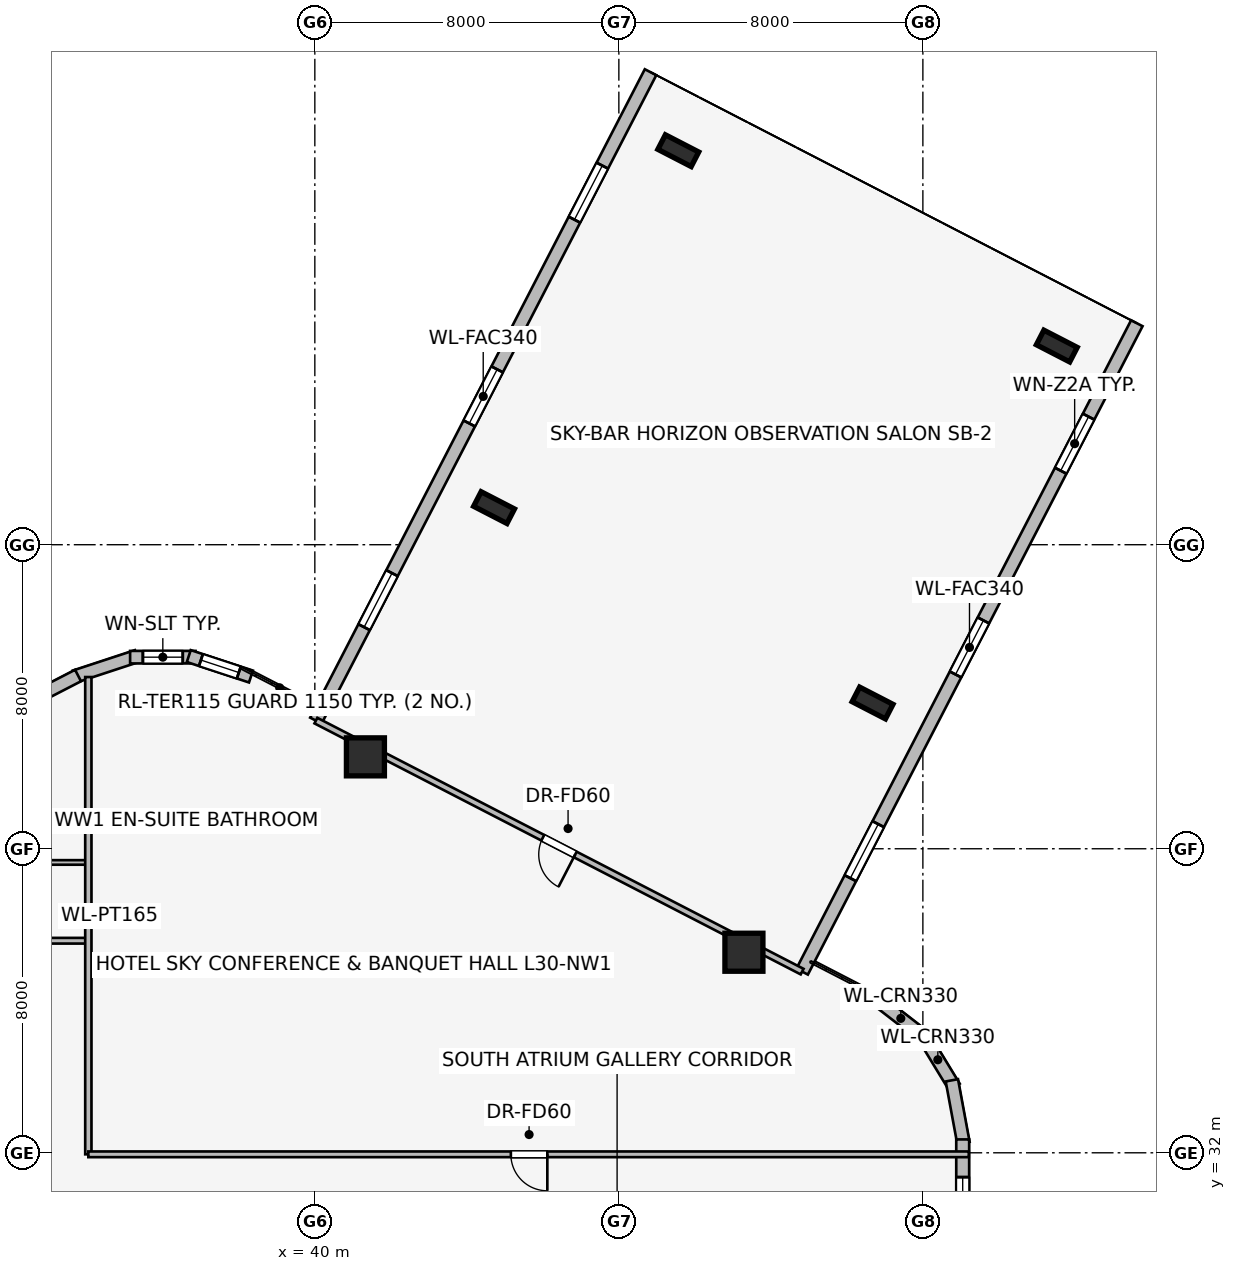
"""IFC4 building model, lengths in metres.
Left out: names, types, materials, properties, quantities, classifications, styles, units other than length and angle.
Written with IfcOpenShell. Run it as: python <this file> out.ifc"""

import sys

from ifc_helpers import new_model, si_unit, direction, frame, frame_2d, origin, origin_2d, place, context, subcontext, project, spatial, rectangle, i_section, extrude, element, fill, save


model = new_model("IFC4")
c1 = context("Model", 3, precision=1e-05, world=origin(), true_north=direction((0.0, 1.0)))
c2 = subcontext(c1, "Body", "Model", "MODEL_VIEW")
j1 = project(units=[si_unit("LENGTHUNIT", "METRE"), si_unit("PLANEANGLEUNIT", "RADIAN")], contexts=[c1])
p1 = place(None, origin())
s1 = spatial("IfcSite", under=j1, at=p1, CompositionType="ELEMENT")
p2 = place(p1, origin())
s2 = spatial("IfcBuilding", under=s1, at=p2, CompositionType="ELEMENT")
p3 = place(p2, frame((0.0, 0.0, 115.35)))
s3 = spatial("IfcBuildingStorey", under=s2, at=p3, CompositionType="ELEMENT", Elevation=115.35)
for number, where, z_axis, x_axis in (
    (1, (51.291, 37.277, 0.0), (0.0, 0.0, 1.0), (1.0, 0.0, 0.0)),
    (2, (41.331, 42.418, 0.0), (0.0, 0.0, 1.0), (1.0, 0.0, 0.0)),
):
    element("IfcColumn", number, at=place(p3, frame(where, z_axis=z_axis, x_axis=x_axis)), inside=s3, PredefinedType="COLUMN", context=c2, shape_type="SweptSolid", body=[
        extrude(rectangle(XDim=1.0, YDim=1.0, at=origin_2d()), origin(), (0.0, 0.0, 1.0), 3.45),
    ])
for number, where, z_axis, x_axis in (
    (3, (54.676, 43.835, 0.0), (0.0, 0.0, 1.0), (0.459, 0.889, 0.0)),
    (4, (44.716, 48.976, 0.0), (0.0, 0.0, 1.0), (0.459, 0.889, 0.0)),
    (5, (59.524, 53.227, 0.0), (0.0, 0.0, 1.0), (0.459, 0.889, 0.0)),
    (6, (49.564, 58.368, 0.0), (0.0, 0.0, 1.0), (0.459, 0.889, 0.0)),
):
    element("IfcColumn", number, at=place(p3, frame(where, z_axis=z_axis, x_axis=x_axis)), inside=s3, PredefinedType="COLUMN", context=c2, shape_type="SweptSolid", body=[
        extrude(i_section(OverallWidth=0.431, OverallDepth=0.987, WebThickness=0.034, FlangeThickness=0.062, at=origin_2d()), origin(), (0.0, 0.0, 1.0), 3.45),
    ])
p4 = place(p3, frame((54.757, 36.05, 0.0), z_axis=(0.0, 0.0, 1.0), x_axis=(0.790621329885, -0.612305408053, 0.0)))
e7 = element("IfcWall", 7, at=p4, inside=s3, PredefinedType="STANDARD", context=c2, shape_type="SweptSolid", body=[
    extrude(rectangle(XDim=1.676, YDim=0.33, at=frame_2d((0.838, 0.0))), origin(), (0.0, 0.0, 1.0), 3.16),
])
p5 = place(p3, frame((55.957, 35.164, 0.0), z_axis=(0.0, 0.0, 1.0), x_axis=(0.520519429557, -0.853849824883, 0.0)))
e8 = element("IfcWall", 8, at=p5, inside=s3, PredefinedType="STANDARD", context=c2, shape_type="SweptSolid", body=[
    extrude(rectangle(XDim=1.677, YDim=0.33, at=frame_2d((0.839, 0.0))), origin(), (0.0, 0.0, 1.0), 3.16),
])
p6 = place(p3, frame((56.763, 33.907, 0.0), z_axis=(0.0, 0.0, 1.0), x_axis=(0.181984991895, -0.983301308209, 0.0)))
e9 = element("IfcWall", 9, at=p6, inside=s3, PredefinedType="STANDARD", context=c2, shape_type="SweptSolid", body=[
    extrude(rectangle(XDim=1.677, YDim=0.33, at=frame_2d((0.838, 0.0))), origin(), (0.0, 0.0, 1.0), 3.16),
])
p7 = place(p3, frame((61.63, 53.828, 0.0), z_axis=(0.0, 0.0, 1.0), x_axis=(-0.458697010696, -0.888592737073, 0.0)))
e10 = element("IfcWall", 10, at=p7, inside=s3, PredefinedType="STANDARD", context=c2, shape_type="SweptSolid", body=[
    extrude(rectangle(XDim=19.2, YDim=0.34, at=frame_2d((9.6, 0.0))), origin(), (0.0, 0.0, 1.0), 3.16),
])
p8 = place(p7, frame((2.767, 0.0, 0.75)))
e11 = element("IfcOpeningElement", 11, at=p8, cuts=e10, PredefinedType="OPENING", context=c2, shape_type="SweptSolid", body=[
    extrude(rectangle(XDim=1.6, YDim=1.55, at=frame_2d((0.8, 0.775))), frame((0.0, 0.18, 0.0), z_axis=(0.0, -1.0, 0.0), x_axis=(1.0, 0.0, 0.0)), (0.0, 0.0, 1.0), 0.36),
])
p9 = place(p7, frame((8.8, 0.0, 0.75)))
e12 = element("IfcOpeningElement", 12, at=p9, cuts=e10, PredefinedType="OPENING", context=c2, shape_type="SweptSolid", body=[
    extrude(rectangle(XDim=1.6, YDim=1.55, at=frame_2d((0.8, 0.775))), frame((0.0, 0.18, 0.0), z_axis=(0.0, -1.0, 0.0), x_axis=(1.0, 0.0, 0.0)), (0.0, 0.0, 1.0), 0.36),
])
p10 = place(p7, frame((14.833, 0.0, 0.75)))
e13 = element("IfcOpeningElement", 13, at=p10, cuts=e10, PredefinedType="OPENING", context=c2, shape_type="SweptSolid", body=[
    extrude(rectangle(XDim=1.6, YDim=1.55, at=frame_2d((0.8, 0.775))), frame((0.0, 0.18, 0.0), z_axis=(0.0, -1.0, 0.0), x_axis=(1.0, 0.0, 0.0)), (0.0, 0.0, 1.0), 0.36),
])
p11 = place(p3, frame((40.028, 43.372, 0.0), z_axis=(0.0, 0.0, 1.0), x_axis=(0.45865166523, 0.888616143215, 0.0)))
e14 = element("IfcWall", 14, at=p11, inside=s3, PredefinedType="STANDARD", context=c2, shape_type="SweptSolid", body=[
    extrude(rectangle(XDim=19.199, YDim=0.34, at=frame_2d((9.6, 0.0))), origin(), (0.0, 0.0, 1.0), 3.16),
])
p12 = place(p11, frame((2.767, 0.0, 0.75)))
e15 = element("IfcOpeningElement", 15, at=p12, cuts=e14, PredefinedType="OPENING", context=c2, shape_type="SweptSolid", body=[
    extrude(rectangle(XDim=1.6, YDim=1.55, at=frame_2d((0.8, 0.775))), frame((0.0, 0.18, 0.0), z_axis=(0.0, -1.0, 0.0), x_axis=(1.0, 0.0, 0.0)), (0.0, 0.0, 1.0), 0.36),
])
p13 = place(p11, frame((8.8, 0.0, 0.75)))
e16 = element("IfcOpeningElement", 16, at=p13, cuts=e14, PredefinedType="OPENING", context=c2, shape_type="SweptSolid", body=[
    extrude(rectangle(XDim=1.6, YDim=1.55, at=frame_2d((0.8, 0.775))), frame((0.0, 0.18, 0.0), z_axis=(0.0, -1.0, 0.0), x_axis=(1.0, 0.0, 0.0)), (0.0, 0.0, 1.0), 0.36),
])
p14 = place(p11, frame((14.833, 0.0, 0.75)))
e17 = element("IfcOpeningElement", 17, at=p14, cuts=e14, PredefinedType="OPENING", context=c2, shape_type="SweptSolid", body=[
    extrude(rectangle(XDim=1.6, YDim=1.55, at=frame_2d((0.8, 0.775))), frame((0.0, 0.18, 0.0), z_axis=(0.0, -1.0, 0.0), x_axis=(1.0, 0.0, 0.0)), (0.0, 0.0, 1.0), 0.36),
])
p15 = place(p3, frame((33.681, 44.532, 0.0), z_axis=(0.0, 0.0, 1.0), x_axis=(0.949937416267, 0.312440242569, 0.0)))
e18 = element("IfcWall", 18, at=p15, inside=s3, PredefinedType="STANDARD", context=c2, shape_type="SweptSolid", body=[
    extrude(rectangle(XDim=1.722, YDim=0.33, at=frame_2d((0.861, 0.0))), origin(), (0.0, 0.0, 1.0), 3.16),
])
p16 = place(p3, frame((35.139, 45.041, 0.0), z_axis=(0.0, 0.0, 1.0), x_axis=(1.0, 0.0, 0.0)))
e19 = element("IfcWall", 19, at=p16, inside=s3, PredefinedType="STANDARD", context=c2, shape_type="SweptSolid", body=[
    extrude(rectangle(XDim=1.722, YDim=0.33, at=frame_2d((0.861, 0.0))), origin(), (0.0, 0.0, 1.0), 3.16),
])
p17 = place(p16, frame((0.336, 0.0, 0.75)))
e20 = element("IfcOpeningElement", 20, at=p17, cuts=e19, PredefinedType="OPENING", context=c2, shape_type="SweptSolid", body=[
    extrude(rectangle(XDim=1.05, YDim=1.4, at=frame_2d((0.525, 0.7))), frame((0.0, 0.175, 0.0), z_axis=(0.0, -1.0, 0.0), x_axis=(1.0, 0.0, 0.0)), (0.0, 0.0, 1.0), 0.35),
])
p18 = place(p3, frame((36.683, 45.07, 0.0), z_axis=(0.0, 0.0, 1.0), x_axis=(0.949937416267, -0.312440242569, 0.0)))
e21 = element("IfcWall", 21, at=p18, inside=s3, PredefinedType="STANDARD", context=c2, shape_type="SweptSolid", body=[
    extrude(rectangle(XDim=1.722, YDim=0.33, at=frame_2d((0.861, 0.0))), origin(), (0.0, 0.0, 1.0), 3.16),
])
p19 = place(p18, frame((0.336, 0.0, 0.75)))
e22 = element("IfcOpeningElement", 22, at=p19, cuts=e21, PredefinedType="OPENING", context=c2, shape_type="SweptSolid", body=[
    extrude(rectangle(XDim=1.05, YDim=1.4, at=frame_2d((0.525, 0.7))), frame((0.0, 0.175, 0.0), z_axis=(0.0, -1.0, 0.0), x_axis=(1.0, 0.0, 0.0)), (0.0, 0.0, 1.0), 0.35),
])
p20 = place(p3, frame((17.169, 35.99, 0.0), z_axis=(0.0, 0.0, 1.0), x_axis=(0.888613612362, 0.458656568606, 0.0)))
e23 = element("IfcWall", 23, at=p20, inside=s3, PredefinedType="STANDARD", context=c2, shape_type="SweptSolid", body=[
    extrude(rectangle(XDim=18.681, YDim=0.34, at=frame_2d((9.34, 0.0))), origin(), (0.0, 0.0, 1.0), 3.16),
])
p21 = place(p20, frame((1.023, 0.0, 0.75)))
e24 = element("IfcOpeningElement", 24, at=p21, cuts=e23, PredefinedType="OPENING", context=c2, shape_type="SweptSolid", body=[
    extrude(rectangle(XDim=1.6, YDim=1.55, at=frame_2d((0.8, 0.775))), frame((0.0, 0.18, 0.0), z_axis=(0.0, -1.0, 0.0), x_axis=(1.0, 0.0, 0.0)), (0.0, 0.0, 1.0), 0.36),
])
p22 = place(p20, frame((4.981, 0.0, 0.75)))
e25 = element("IfcOpeningElement", 25, at=p22, cuts=e23, PredefinedType="OPENING", context=c2, shape_type="SweptSolid", body=[
    extrude(rectangle(XDim=2.1, YDim=1.5, at=frame_2d((1.05, 0.75))), frame((0.0, 0.18, 0.0), z_axis=(0.0, -1.0, 0.0), x_axis=(1.0, 0.0, 0.0)), (0.0, 0.0, 1.0), 0.36),
])
p23 = place(p20, frame((8.29, 0.0, 0.75)))
e26 = element("IfcOpeningElement", 26, at=p23, cuts=e23, PredefinedType="OPENING", context=c2, shape_type="SweptSolid", body=[
    extrude(rectangle(XDim=2.1, YDim=1.5, at=frame_2d((1.05, 0.75))), frame((0.0, 0.18, 0.0), z_axis=(0.0, -1.0, 0.0), x_axis=(1.0, 0.0, 0.0)), (0.0, 0.0, 1.0), 0.36),
])
p24 = place(p20, frame((11.6, 0.0, 0.75)))
e27 = element("IfcOpeningElement", 27, at=p24, cuts=e23, PredefinedType="OPENING", context=c2, shape_type="SweptSolid", body=[
    extrude(rectangle(XDim=2.1, YDim=1.5, at=frame_2d((1.05, 0.75))), frame((0.0, 0.18, 0.0), z_axis=(0.0, -1.0, 0.0), x_axis=(1.0, 0.0, 0.0)), (0.0, 0.0, 1.0), 0.36),
])
p25 = place(p20, frame((16.058, 0.0, 0.75)))
e28 = element("IfcOpeningElement", 28, at=p25, cuts=e23, PredefinedType="OPENING", context=c2, shape_type="SweptSolid", body=[
    extrude(rectangle(XDim=1.6, YDim=1.55, at=frame_2d((0.8, 0.775))), frame((0.0, 0.18, 0.0), z_axis=(0.0, -1.0, 0.0), x_axis=(1.0, 0.0, 0.0)), (0.0, 0.0, 1.0), 0.36),
])
p26 = place(p3, frame((57.048, 32.352, 0.0), z_axis=(0.0, 0.0, 1.0), x_axis=(0.0, -1.0, 0.0)))
e29 = element("IfcWall", 29, at=p26, inside=s3, PredefinedType="STANDARD", context=c2, shape_type="SweptSolid", body=[
    extrude(rectangle(XDim=16.704, YDim=0.34, at=frame_2d((8.352, 0.0))), origin(), (0.0, 0.0, 1.0), 3.16),
])
p27 = place(p26, frame((0.992, 0.0, 0.75)))
e30 = element("IfcOpeningElement", 30, at=p27, cuts=e29, PredefinedType="OPENING", context=c2, shape_type="SweptSolid", body=[
    extrude(rectangle(XDim=1.05, YDim=1.4, at=frame_2d((0.525, 0.7))), frame((0.0, 0.18, 0.0), z_axis=(0.0, -1.0, 0.0), x_axis=(1.0, 0.0, 0.0)), (0.0, 0.0, 1.0), 0.36),
])
p28 = place(p26, frame((4.935, 0.0, 0.75)))
e31 = element("IfcOpeningElement", 31, at=p28, cuts=e29, PredefinedType="OPENING", context=c2, shape_type="SweptSolid", body=[
    extrude(rectangle(XDim=2.1, YDim=1.5, at=frame_2d((1.05, 0.75))), frame((0.0, 0.18, 0.0), z_axis=(0.0, -1.0, 0.0), x_axis=(1.0, 0.0, 0.0)), (0.0, 0.0, 1.0), 0.36),
])
p29 = place(p26, frame((9.919, 0.0, 0.75)))
e32 = element("IfcOpeningElement", 32, at=p29, cuts=e29, PredefinedType="OPENING", context=c2, shape_type="SweptSolid", body=[
    extrude(rectangle(XDim=1.6, YDim=1.55, at=frame_2d((0.8, 0.775))), frame((0.0, 0.18, 0.0), z_axis=(0.0, -1.0, 0.0), x_axis=(1.0, 0.0, 0.0)), (0.0, 0.0, 1.0), 0.36),
])
p30 = place(p26, frame((14.702, 0.0, 0.75)))
e33 = element("IfcOpeningElement", 33, at=p30, cuts=e29, PredefinedType="OPENING", context=c2, shape_type="SweptSolid", body=[
    extrude(rectangle(XDim=1.05, YDim=1.4, at=frame_2d((0.525, 0.7))), frame((0.0, 0.18, 0.0), z_axis=(0.0, -1.0, 0.0), x_axis=(1.0, 0.0, 0.0)), (0.0, 0.0, 1.0), 0.36),
])
p31 = place(p3, frame((34.0, 39.64, 0.0), z_axis=(0.0, 0.0, 1.0), x_axis=(-1.0, 0.0, 0.0)))
e34 = element("IfcWall", 34, at=p31, inside=s3, PredefinedType="PARTITIONING", context=c2, shape_type="SweptSolid", body=[
    extrude(rectangle(XDim=2.34, YDim=0.12, at=frame_2d((1.17, 0.0))), origin(), (0.0, 0.0, 1.0), 2.552),
])
p32 = place(p3, frame((34.0, 37.58, 0.0), z_axis=(0.0, 0.0, 1.0), x_axis=(-1.0, 0.0, 0.0)))
e35 = element("IfcWall", 35, at=p32, inside=s3, PredefinedType="PARTITIONING", context=c2, shape_type="SweptSolid", body=[
    extrude(rectangle(XDim=13.707, YDim=0.15, at=frame_2d((6.854, 0.0))), origin(), (0.0, 0.0, 1.0), 2.627),
])
p33 = place(p32, frame((4.96, 0.0, 0.0)))
e36 = element("IfcOpeningElement", 36, at=p33, cuts=e35, PredefinedType="OPENING", context=c2, shape_type="SweptSolid", body=[
    extrude(rectangle(XDim=0.96, YDim=2.0, at=frame_2d((0.48, 1.0))), frame((0.0, 0.085, 0.0), z_axis=(0.0, -1.0, 0.0), x_axis=(1.0, 0.0, 0.0)), (0.0, 0.0, 1.0), 0.17),
])
p34 = place(p3, frame((34.04, 31.96, 0.0), z_axis=(0.0, 0.0, 1.0), x_axis=(0.0, 1.0, 0.0)))
e37 = element("IfcWall", 37, at=p34, inside=s3, PredefinedType="PARTITIONING", context=c2, shape_type="SweptSolid", body=[
    extrude(rectangle(XDim=12.558, YDim=0.165, at=frame_2d((6.279, 0.0))), origin(), (0.0, 0.0, 1.0), 3.16),
])
p35 = place(p3, frame((57.208, 31.96, 0.0), z_axis=(0.0, 0.0, 1.0), x_axis=(-1.0, 0.0, 0.0)))
e38 = element("IfcWall", 38, at=p35, inside=s3, PredefinedType="PARTITIONING", context=c2, shape_type="SweptSolid", body=[
    extrude(rectangle(XDim=23.168, YDim=0.15, at=frame_2d((11.584, 0.0))), origin(), (0.0, 0.0, 1.0), 3.16),
])
p36 = place(p35, frame((11.09, 0.0, 0.0)))
e39 = element("IfcOpeningElement", 39, at=p36, cuts=e38, PredefinedType="OPENING", context=c2, shape_type="SweptSolid", body=[
    extrude(rectangle(XDim=0.96, YDim=2.0, at=frame_2d((0.48, 1.0))), frame((0.0, 0.085, 0.0), z_axis=(0.0, -1.0, 0.0), x_axis=(1.0, 0.0, 0.0)), (0.0, 0.0, 1.0), 0.17),
])
p37 = place(p3, frame((52.823, 36.767, 0.0), z_axis=(0.0, 0.0, 1.0), x_axis=(-0.888588109751, 0.458705974683, 0.0)))
e40 = element("IfcWall", 40, at=p37, inside=s3, PredefinedType="PARTITIONING", context=c2, shape_type="SweptSolid", body=[
    extrude(rectangle(XDim=14.399, YDim=0.165, at=frame_2d((7.2, 0.0))), origin(), (0.0, 0.0, 1.0), 2.532),
])
p38 = place(p37, frame((6.72, 0.0, 0.0)))
e41 = element("IfcOpeningElement", 41, at=p38, cuts=e40, PredefinedType="OPENING", context=c2, shape_type="SweptSolid", body=[
    extrude(rectangle(XDim=0.96, YDim=2.0, at=frame_2d((0.48, 1.0))), frame((0.0, 0.093, 0.0), z_axis=(0.0, -1.0, 0.0), x_axis=(1.0, 0.0, 0.0)), (0.0, 0.0, 1.0), 0.185),
])
p39 = place(p8, origin())
e42 = element("IfcWindow", 42, at=p39, inside=s3, PartitioningType="SINGLE_PANEL", PredefinedType="WINDOW", context=c2, shape_type="SweptSolid", body=[
    extrude(rectangle(XDim=1.6, YDim=1.55, at=frame_2d((0.8, 0.775))), frame((0.0, 0.03, 0.0), z_axis=(0.0, -1.0, 0.0), x_axis=(1.0, 0.0, 0.0)), (0.0, 0.0, 1.0), 0.06),
])
fill(e11, e42)
p40 = place(p9, origin())
e43 = element("IfcWindow", 43, at=p40, inside=s3, PartitioningType="SINGLE_PANEL", PredefinedType="WINDOW", context=c2, shape_type="SweptSolid", body=[
    extrude(rectangle(XDim=1.6, YDim=1.55, at=frame_2d((0.8, 0.775))), frame((0.0, 0.03, 0.0), z_axis=(0.0, -1.0, 0.0), x_axis=(1.0, 0.0, 0.0)), (0.0, 0.0, 1.0), 0.06),
])
fill(e12, e43)
p41 = place(p10, origin())
e44 = element("IfcWindow", 44, at=p41, inside=s3, PartitioningType="SINGLE_PANEL", PredefinedType="WINDOW", context=c2, shape_type="SweptSolid", body=[
    extrude(rectangle(XDim=1.6, YDim=1.55, at=frame_2d((0.8, 0.775))), frame((0.0, 0.03, 0.0), z_axis=(0.0, -1.0, 0.0), x_axis=(1.0, 0.0, 0.0)), (0.0, 0.0, 1.0), 0.06),
])
fill(e13, e44)
p42 = place(p12, origin())
e45 = element("IfcWindow", 45, at=p42, inside=s3, PartitioningType="SINGLE_PANEL", PredefinedType="WINDOW", context=c2, shape_type="SweptSolid", body=[
    extrude(rectangle(XDim=1.6, YDim=1.55, at=frame_2d((0.8, 0.775))), frame((0.0, 0.03, 0.0), z_axis=(0.0, -1.0, 0.0), x_axis=(1.0, 0.0, 0.0)), (0.0, 0.0, 1.0), 0.06),
])
fill(e15, e45)
p43 = place(p13, origin())
e46 = element("IfcWindow", 46, at=p43, inside=s3, PartitioningType="SINGLE_PANEL", PredefinedType="WINDOW", context=c2, shape_type="SweptSolid", body=[
    extrude(rectangle(XDim=1.6, YDim=1.55, at=frame_2d((0.8, 0.775))), frame((0.0, 0.03, 0.0), z_axis=(0.0, -1.0, 0.0), x_axis=(1.0, 0.0, 0.0)), (0.0, 0.0, 1.0), 0.06),
])
fill(e16, e46)
p44 = place(p14, origin())
e47 = element("IfcWindow", 47, at=p44, inside=s3, PartitioningType="SINGLE_PANEL", PredefinedType="WINDOW", context=c2, shape_type="SweptSolid", body=[
    extrude(rectangle(XDim=1.6, YDim=1.55, at=frame_2d((0.8, 0.775))), frame((0.0, 0.03, 0.0), z_axis=(0.0, -1.0, 0.0), x_axis=(1.0, 0.0, 0.0)), (0.0, 0.0, 1.0), 0.06),
])
fill(e17, e47)
p45 = place(p17, origin())
e48 = element("IfcWindow", 48, at=p45, inside=s3, PartitioningType="SINGLE_PANEL", PredefinedType="WINDOW", context=c2, shape_type="SweptSolid", body=[
    extrude(rectangle(XDim=1.05, YDim=1.4, at=frame_2d((0.525, 0.7))), frame((0.0, 0.03, 0.0), z_axis=(0.0, -1.0, 0.0), x_axis=(1.0, 0.0, 0.0)), (0.0, 0.0, 1.0), 0.06),
])
fill(e20, e48)
p46 = place(p19, origin())
e49 = element("IfcWindow", 49, at=p46, inside=s3, PartitioningType="SINGLE_PANEL", PredefinedType="WINDOW", context=c2, shape_type="SweptSolid", body=[
    extrude(rectangle(XDim=1.05, YDim=1.4, at=frame_2d((0.525, 0.7))), frame((0.0, 0.03, 0.0), z_axis=(0.0, -1.0, 0.0), x_axis=(1.0, 0.0, 0.0)), (0.0, 0.0, 1.0), 0.06),
])
fill(e22, e49)
p47 = place(p27, origin())
e50 = element("IfcWindow", 50, at=p47, inside=s3, PartitioningType="SINGLE_PANEL", PredefinedType="WINDOW", context=c2, shape_type="SweptSolid", body=[
    extrude(rectangle(XDim=1.05, YDim=1.4, at=frame_2d((0.525, 0.7))), frame((0.0, 0.03, 0.0), z_axis=(0.0, -1.0, 0.0), x_axis=(1.0, 0.0, 0.0)), (0.0, 0.0, 1.0), 0.06),
])
fill(e30, e50)
p48 = place(p36, origin())
e51 = element("IfcDoor", 51, at=p48, inside=s3, OperationType="SINGLE_SWING_LEFT", PredefinedType="DOOR", context=c2, shape_type="SweptSolid", body=[
    extrude(rectangle(XDim=0.96, YDim=2.0, at=frame_2d((0.48, 1.0))), frame((0.0, 0.025, 0.0), z_axis=(0.0, -1.0, 0.0), x_axis=(1.0, 0.0, 0.0)), (0.0, 0.0, 1.0), 0.05),
])
fill(e39, e51)
p49 = place(p38, origin())
e52 = element("IfcDoor", 52, at=p49, inside=s3, OperationType="SINGLE_SWING_LEFT", PredefinedType="DOOR", context=c2, shape_type="SweptSolid", body=[
    extrude(rectangle(XDim=0.96, YDim=2.0, at=frame_2d((0.48, 1.0))), frame((0.0, 0.025, 0.0), z_axis=(0.0, -1.0, 0.0), x_axis=(1.0, 0.0, 0.0)), (0.0, 0.0, 1.0), 0.05),
])
fill(e41, e52)
save(model, sys.argv[1])
